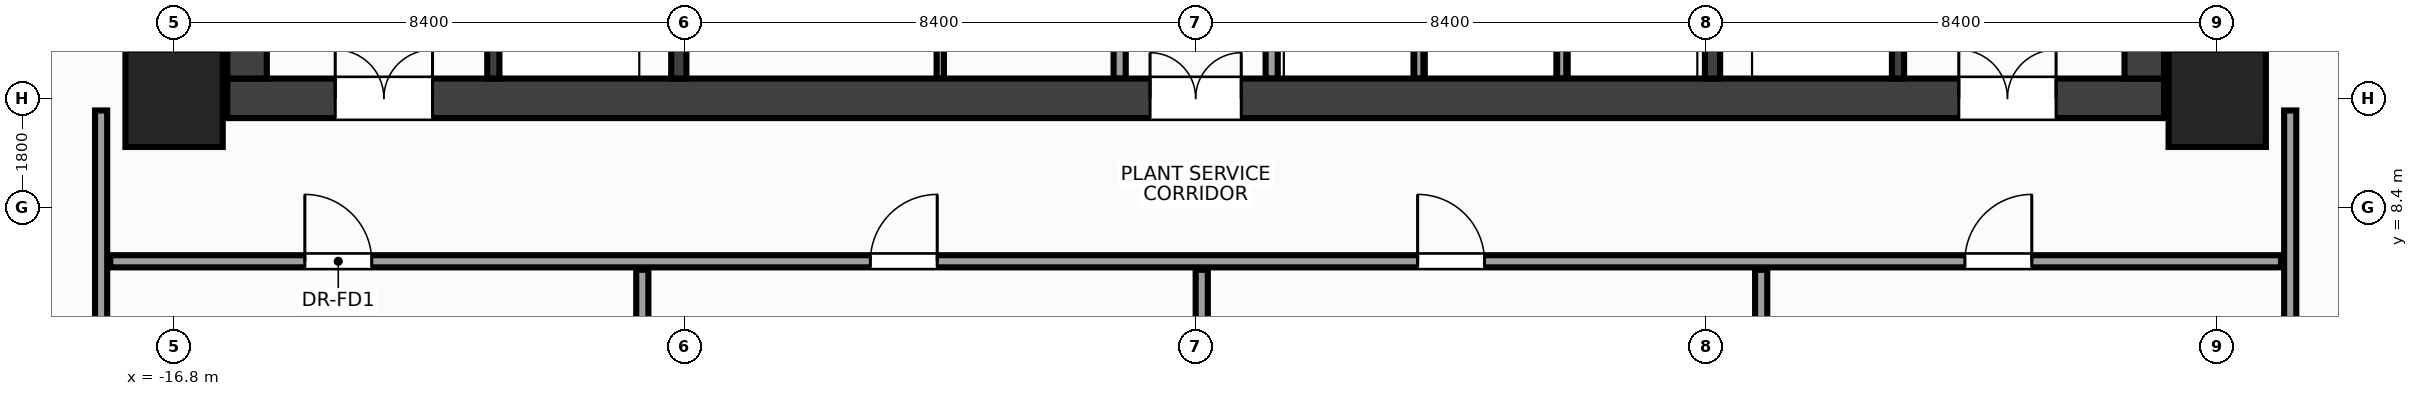
"""IFC4 building model, lengths in metres.
Left out: names, types, materials, properties, quantities, classifications, styles, units other than length and angle.
Written with IfcOpenShell. Run it as: python <this file> out.ifc"""

import sys

from ifc_helpers import new_model, si_unit, direction, frame, frame_2d, origin, origin_2d, place, context, subcontext, project, spatial, rectangle, extrude, source, transform, mapped, element, fill, save


model = new_model("IFC4")
c1 = context("Model", 3, precision=1e-05, world=origin(), true_north=direction((0.0, 1.0)))
c2 = subcontext(c1, "Body", "Model", "MODEL_VIEW")
j1 = project(units=[si_unit("LENGTHUNIT", "METRE"), si_unit("PLANEANGLEUNIT", "RADIAN")], contexts=[c1])
p1 = place(None, origin())
s1 = spatial("IfcSite", under=j1, at=p1, CompositionType="ELEMENT")
p2 = place(p1, origin())
s2 = spatial("IfcBuilding", under=s1, at=p2, CompositionType="ELEMENT")
p3 = place(p2, frame((0.0, 0.0, 124.4)))
s3 = spatial("IfcBuildingStorey", under=s2, at=p3, CompositionType="ELEMENT", Elevation=124.4)
m1 = source(origin(), c2, "Body", "SweptSolid", [
    extrude(rectangle(XDim=31.85, YDim=0.65, at=frame_2d((15.925, 0.0))), origin(), (0.0, 0.0, 1.0), 7.2),
])
p4 = place(p3, frame((-15.925, 10.2, 0.0), z_axis=(0.0, 0.0, 1.0), x_axis=(1.0, 0.0, 0.0)))
e1 = element("IfcWall", 1, at=p4, inside=s3, PredefinedType="SHEAR", context=c2, shape_type="MappedRepresentation", body=[
    mapped(m1, transform((0.0, 0.0, 0.0), x_axis=(1.0, 0.0, 0.0), y_axis=(0.0, 1.0, 0.0), z_axis=(0.0, 0.0, 1.0), scale=1.0)),
])
p5 = place(p4, frame((1.775, 0.0, 0.0)))
e2 = element("IfcOpeningElement", 2, at=p5, cuts=e1, PredefinedType="OPENING", context=c2, shape_type="SweptSolid", body=[
    extrude(rectangle(XDim=1.6, YDim=2.15, at=frame_2d((0.8, 1.075))), frame((0.0, 0.337, 0.0), z_axis=(0.0, -1.0, 0.0), x_axis=(1.0, 0.0, 0.0)), (0.0, 0.0, 1.0), 0.674),
])
p6 = place(p4, frame((28.475, 0.0, 0.0)))
e3 = element("IfcOpeningElement", 3, at=p6, cuts=e1, PredefinedType="OPENING", context=c2, shape_type="SweptSolid", body=[
    extrude(rectangle(XDim=1.6, YDim=2.15, at=frame_2d((0.8, 1.075))), frame((0.0, 0.337, 0.0), z_axis=(0.0, -1.0, 0.0), x_axis=(1.0, 0.0, 0.0)), (0.0, 0.0, 1.0), 0.674),
])
p7 = place(p4, frame((15.175, 0.0, 0.0)))
e4 = element("IfcOpeningElement", 4, at=p7, cuts=e1, PredefinedType="OPENING", context=c2, shape_type="SweptSolid", body=[
    extrude(rectangle(XDim=1.5, YDim=2.2, at=frame_2d((0.75, 1.1))), frame((0.0, 0.337, 0.0), z_axis=(0.0, -1.0, 0.0), x_axis=(1.0, 0.0, 0.0)), (0.0, 0.0, 1.0), 0.674),
])
m2 = source(origin(), c2, "Body", "SweptSolid", [
    extrude(rectangle(XDim=12.95, YDim=0.65, at=frame_2d((6.475, 0.0))), origin(), (0.0, 0.0, 1.0), 7.2),
])
for number, where, z_axis, x_axis in (
    (5, (-15.6, 10.525, 0.0), (0.0, 0.0, 1.0), (0.0, 1.0, 0.0)),
    (6, (15.6, 10.525, 0.0), (0.0, 0.0, 1.0), (0.0, 1.0, 0.0)),
):
    element("IfcWall", number, at=place(p3, frame(where, z_axis=z_axis, x_axis=x_axis)), inside=s3, PredefinedType="SHEAR", context=c2, shape_type="MappedRepresentation", body=[
        mapped(m2, transform((0.0, 0.0, 0.0), x_axis=(1.0, 0.0, 0.0), y_axis=(0.0, 1.0, 0.0), z_axis=(0.0, 0.0, 1.0), scale=1.0)),
    ])
m3 = source(origin(), c2, "Body", "SweptSolid", [
    extrude(rectangle(XDim=12.95, YDim=0.25, at=frame_2d((6.475, 0.0))), origin(), (0.0, 0.0, 1.0), 7.2),
])
p8 = place(p3, frame((-8.5, 10.525, 0.0), z_axis=(0.0, 0.0, 1.0), x_axis=(0.0, 1.0, 0.0)))
e7 = element("IfcWall", 7, at=p8, inside=s3, PredefinedType="SHEAR", context=c2, shape_type="MappedRepresentation", body=[
    mapped(m3, transform((0.0, 0.0, 0.0), x_axis=(1.0, 0.0, 0.0), y_axis=(0.0, 1.0, 0.0), z_axis=(0.0, 0.0, 1.0), scale=1.0)),
])
p9 = place(p8, frame((5.075, 0.0, 0.0)))
e8 = element("IfcOpeningElement", 8, at=p9, cuts=e7, PredefinedType="OPENING", context=c2, shape_type="SweptSolid", body=[
    extrude(rectangle(XDim=0.95, YDim=2.15, at=frame_2d((0.475, 1.075))), frame((0.0, 0.137, 0.0), z_axis=(0.0, -1.0, 0.0), x_axis=(1.0, 0.0, 0.0)), (0.0, 0.0, 1.0), 0.274),
])
p10 = place(p8, frame((8.175, 0.0, 0.0)))
e9 = element("IfcOpeningElement", 9, at=p10, cuts=e7, PredefinedType="OPENING", context=c2, shape_type="SweptSolid", body=[
    extrude(rectangle(XDim=0.95, YDim=2.15, at=frame_2d((0.475, 1.075))), frame((0.0, 0.137, 0.0), z_axis=(0.0, -1.0, 0.0), x_axis=(1.0, 0.0, 0.0)), (0.0, 0.0, 1.0), 0.274),
])
p11 = place(p3, frame((8.5, 10.525, 0.0), z_axis=(0.0, 0.0, 1.0), x_axis=(0.0, 1.0, 0.0)))
e10 = element("IfcWall", 10, at=p11, inside=s3, PredefinedType="SHEAR", context=c2, shape_type="MappedRepresentation", body=[
    mapped(m3, transform((0.0, 0.0, 0.0), x_axis=(1.0, 0.0, 0.0), y_axis=(0.0, 1.0, 0.0), z_axis=(0.0, 0.0, 1.0), scale=1.0)),
])
p12 = place(p11, frame((9.925, 0.0, 0.0)))
e11 = element("IfcOpeningElement", 11, at=p12, cuts=e10, PredefinedType="OPENING", context=c2, shape_type="SweptSolid", body=[
    extrude(rectangle(XDim=0.95, YDim=2.15, at=frame_2d((0.475, 1.075))), frame((0.0, 0.137, 0.0), z_axis=(0.0, -1.0, 0.0), x_axis=(1.0, 0.0, 0.0)), (0.0, 0.0, 1.0), 0.274),
])
m4 = source(origin(), c2, "Body", "SweptSolid", [
    extrude(rectangle(XDim=3.125, YDim=0.2, at=frame_2d((1.562, 0.0))), origin(), (0.0, 0.0, 1.0), 7.2),
])
p13 = place(p3, frame((-11.55, 10.525, 0.0), z_axis=(0.0, 0.0, 1.0), x_axis=(0.0, 1.0, 0.0)))
e12 = element("IfcWall", 12, at=p13, inside=s3, PredefinedType="SHEAR", context=c2, shape_type="MappedRepresentation", body=[
    mapped(m4, transform((0.0, 0.0, 0.0), x_axis=(1.0, 0.0, 0.0), y_axis=(0.0, 1.0, 0.0), z_axis=(0.0, 0.0, 1.0), scale=1.0)),
])
p14 = place(p13, frame((0.9, 0.0, 0.0)))
e13 = element("IfcOpeningElement", 13, at=p14, cuts=e12, PredefinedType="OPENING", context=c2, shape_type="SweptSolid", body=[
    extrude(rectangle(XDim=1.1, YDim=2.15, at=frame_2d((0.55, 1.075))), frame((0.0, 0.112, 0.0), z_axis=(0.0, -1.0, 0.0), x_axis=(1.0, 0.0, 0.0)), (0.0, 0.0, 1.0), 0.224),
])
p15 = place(p3, frame((11.55, 10.525, 0.0), z_axis=(0.0, 0.0, 1.0), x_axis=(0.0, 1.0, 0.0)))
e14 = element("IfcWall", 14, at=p15, inside=s3, PredefinedType="SHEAR", context=c2, shape_type="MappedRepresentation", body=[
    mapped(m4, transform((0.0, 0.0, 0.0), x_axis=(1.0, 0.0, 0.0), y_axis=(0.0, 1.0, 0.0), z_axis=(0.0, 0.0, 1.0), scale=1.0)),
])
p16 = place(p15, frame((0.9, 0.0, 0.0)))
e15 = element("IfcOpeningElement", 15, at=p16, cuts=e14, PredefinedType="OPENING", context=c2, shape_type="SweptSolid", body=[
    extrude(rectangle(XDim=1.1, YDim=2.15, at=frame_2d((0.55, 1.075))), frame((0.0, 0.112, 0.0), z_axis=(0.0, -1.0, 0.0), x_axis=(1.0, 0.0, 0.0)), (0.0, 0.0, 1.0), 0.224),
])
m5 = source(origin(), c2, "Body", "SweptSolid", [
    extrude(rectangle(XDim=1.6, YDim=1.6, at=origin_2d()), origin(), (0.0, 0.0, 1.0), 7.2),
])
for number, where, z_axis, x_axis in (
    (16, (-16.8, 10.2, 0.0), (0.0, 0.0, 1.0), (1.0, 0.0, 0.0)),
    (17, (16.8, 10.2, 0.0), (0.0, 0.0, 1.0), (1.0, 0.0, 0.0)),
):
    element("IfcColumn", number, at=place(p3, frame(where, z_axis=z_axis, x_axis=x_axis)), inside=s3, PredefinedType="COLUMN", context=c2, shape_type="MappedRepresentation", body=[
        mapped(m5, transform((0.0, 0.0, 0.0), x_axis=(1.0, 0.0, 0.0), y_axis=(0.0, 1.0, 0.0), z_axis=(0.0, 0.0, 1.0), scale=1.0)),
    ])
m6 = source(origin(), c2, "Body", "SweptSolid", [
    extrude(rectangle(XDim=3.415, YDim=0.2, at=frame_2d((1.708, 0.0))), origin(), (0.0, 0.0, 1.0), 6.9),
])
for number, where, z_axis, x_axis in (
    (18, (-1.25, 10.525, 0.0), (0.0, 0.0, 1.0), (0.0, 1.0, 0.0)),
    (19, (1.25, 10.525, 0.0), (0.0, 0.0, 1.0), (0.0, 1.0, 0.0)),
):
    element("IfcWall", number, at=place(p3, frame(where, z_axis=z_axis, x_axis=x_axis)), inside=s3, PredefinedType="PARTITIONING", context=c2, shape_type="MappedRepresentation", body=[
        mapped(m6, transform((0.0, 0.0, 0.0), x_axis=(1.0, 0.0, 0.0), y_axis=(0.0, 1.0, 0.0), z_axis=(0.0, 0.0, 1.0), scale=1.0)),
    ])
m7 = source(origin(), c2, "Body", "SweptSolid", [
    extrude(rectangle(XDim=3.415, YDim=0.12, at=frame_2d((1.708, 0.0))), origin(), (0.0, 0.0, 1.0), 6.9),
])
p17 = place(p3, frame((-4.2, 10.525, 0.0), z_axis=(0.0, 0.0, 1.0), x_axis=(0.0, 1.0, 0.0)))
e20 = element("IfcWall", 20, at=p17, inside=s3, PredefinedType="PARTITIONING", context=c2, shape_type="MappedRepresentation", body=[
    mapped(m7, transform((0.0, 0.0, 0.0), x_axis=(1.0, 0.0, 0.0), y_axis=(0.0, 1.0, 0.0), z_axis=(0.0, 0.0, 1.0), scale=1.0)),
])
m8 = source(origin(), c2, "Body", "SweptSolid", [
    extrude(rectangle(XDim=3.415, YDim=0.15, at=frame_2d((1.708, 0.0))), origin(), (0.0, 0.0, 1.0), 6.9),
])
for number, where, z_axis, x_axis in (
    (21, (3.67, 10.525, 0.0), (0.0, 0.0, 1.0), (0.0, 1.0, 0.0)),
    (22, (6.02, 10.525, 0.0), (0.0, 0.0, 1.0), (0.0, 1.0, 0.0)),
):
    element("IfcWall", number, at=place(p3, frame(where, z_axis=z_axis, x_axis=x_axis)), inside=s3, PredefinedType="PARTITIONING", context=c2, shape_type="MappedRepresentation", body=[
        mapped(m8, transform((0.0, 0.0, 0.0), x_axis=(1.0, 0.0, 0.0), y_axis=(0.0, 1.0, 0.0), z_axis=(0.0, 0.0, 1.0), scale=1.0)),
    ])
m9 = source(origin(), c2, "Body", "SweptSolid", [
    extrude(rectangle(XDim=22.85, YDim=0.2, at=frame_2d((11.425, 0.0))), origin(), (0.0, 0.0, 1.0), 6.435),
])
for number, where, z_axis, x_axis in (
    (23, (-18.0, -12.85, 0.0), (0.0, 0.0, 1.0), (0.0, 1.0, 0.0)),
    (24, (18.0, -12.85, 0.0), (0.0, 0.0, 1.0), (0.0, 1.0, 0.0)),
):
    element("IfcWall", number, at=place(p3, frame(where, z_axis=z_axis, x_axis=x_axis)), inside=s3, PredefinedType="PARTITIONING", context=c2, shape_type="MappedRepresentation", body=[
        mapped(m9, transform((0.0, 0.0, 0.0), x_axis=(1.0, 0.0, 0.0), y_axis=(0.0, 1.0, 0.0), z_axis=(0.0, 0.0, 1.0), scale=1.0)),
    ])
m10 = source(origin(), c2, "Body", "SweptSolid", [
    extrude(rectangle(XDim=35.7, YDim=0.2, at=frame_2d((17.85, 0.0))), origin(), (0.0, 0.0, 1.0), 6.285),
])
p18 = place(p3, frame((-17.85, 7.52, 0.0), z_axis=(0.0, 0.0, 1.0), x_axis=(1.0, 0.0, 0.0)))
e25 = element("IfcWall", 25, at=p18, inside=s3, PredefinedType="PARTITIONING", context=c2, shape_type="MappedRepresentation", body=[
    mapped(m10, transform((0.0, 0.0, 0.0), x_axis=(1.0, 0.0, 0.0), y_axis=(0.0, 1.0, 0.0), z_axis=(0.0, 0.0, 1.0), scale=1.0)),
])
p19 = place(p18, frame((3.2, 0.0, 0.0)))
e26 = element("IfcOpeningElement", 26, at=p19, cuts=e25, PredefinedType="OPENING", context=c2, shape_type="SweptSolid", body=[
    extrude(rectangle(XDim=1.1, YDim=2.15, at=frame_2d((0.55, 1.075))), frame((0.0, 0.112, 0.0), z_axis=(0.0, -1.0, 0.0), x_axis=(1.0, 0.0, 0.0)), (0.0, 0.0, 1.0), 0.224),
])
p20 = place(p18, frame((12.5, 0.0, 0.0)))
e27 = element("IfcOpeningElement", 27, at=p20, cuts=e25, PredefinedType="OPENING", context=c2, shape_type="SweptSolid", body=[
    extrude(rectangle(XDim=1.1, YDim=2.15, at=frame_2d((0.55, 1.075))), frame((0.0, 0.112, 0.0), z_axis=(0.0, -1.0, 0.0), x_axis=(1.0, 0.0, 0.0)), (0.0, 0.0, 1.0), 0.224),
])
p21 = place(p18, frame((21.5, 0.0, 0.0)))
e28 = element("IfcOpeningElement", 28, at=p21, cuts=e25, PredefinedType="OPENING", context=c2, shape_type="SweptSolid", body=[
    extrude(rectangle(XDim=1.1, YDim=2.15, at=frame_2d((0.55, 1.075))), frame((0.0, 0.112, 0.0), z_axis=(0.0, -1.0, 0.0), x_axis=(1.0, 0.0, 0.0)), (0.0, 0.0, 1.0), 0.224),
])
p22 = place(p18, frame((30.5, 0.0, 0.0)))
e29 = element("IfcOpeningElement", 29, at=p22, cuts=e25, PredefinedType="OPENING", context=c2, shape_type="SweptSolid", body=[
    extrude(rectangle(XDim=1.1, YDim=2.15, at=frame_2d((0.55, 1.075))), frame((0.0, 0.112, 0.0), z_axis=(0.0, -1.0, 0.0), x_axis=(1.0, 0.0, 0.0)), (0.0, 0.0, 1.0), 0.224),
])
m11 = source(origin(), c2, "Body", "SweptSolid", [
    extrude(rectangle(XDim=20.23, YDim=0.2, at=frame_2d((10.115, 0.0))), origin(), (0.0, 0.0, 1.0), 6.185),
])
for number, where, z_axis, x_axis in (
    (30, (-9.1, -12.85, 0.0), (0.0, 0.0, 1.0), (0.0, 1.0, 0.0)),
    (31, (0.1, -12.85, 0.0), (0.0, 0.0, 1.0), (0.0, 1.0, 0.0)),
):
    element("IfcWall", number, at=place(p3, frame(where, z_axis=z_axis, x_axis=x_axis)), inside=s3, PredefinedType="PARTITIONING", context=c2, shape_type="MappedRepresentation", body=[
        mapped(m11, transform((0.0, 0.0, 0.0), x_axis=(1.0, 0.0, 0.0), y_axis=(0.0, 1.0, 0.0), z_axis=(0.0, 0.0, 1.0), scale=1.0)),
    ])
p23 = place(p3, frame((9.3, -12.85, 0.0), z_axis=(0.0, 0.0, 1.0), x_axis=(0.0, 1.0, 0.0)))
e32 = element("IfcWall", 32, at=p23, inside=s3, PredefinedType="PARTITIONING", context=c2, shape_type="MappedRepresentation", body=[
    mapped(m11, transform((0.0, 0.0, 0.0), x_axis=(1.0, 0.0, 0.0), y_axis=(0.0, 1.0, 0.0), z_axis=(0.0, 0.0, 1.0), scale=1.0)),
])
p24 = place(p23, frame((5.2, 0.0, 0.0)))
e33 = element("IfcOpeningElement", 33, at=p24, cuts=e32, PredefinedType="OPENING", context=c2, shape_type="SweptSolid", body=[
    extrude(rectangle(XDim=1.1, YDim=2.15, at=frame_2d((0.55, 1.075))), frame((0.0, 0.112, 0.0), z_axis=(0.0, -1.0, 0.0), x_axis=(1.0, 0.0, 0.0)), (0.0, 0.0, 1.0), 0.224),
])
m12 = source(origin(), c2, "Body", "SweptSolid", [
    extrude(rectangle(XDim=1.6, YDim=2.15, at=frame_2d((0.8, 1.075))), frame((0.0, 0.025, 0.0), z_axis=(0.0, -1.0, 0.0), x_axis=(1.0, 0.0, 0.0)), (0.0, 0.0, 1.0), 0.05),
])
p25 = place(p5, origin())
e34 = element("IfcDoor", 34, at=p25, inside=s3, OperationType="DOUBLE_DOOR_SINGLE_SWING", PredefinedType="DOOR", context=c2, shape_type="MappedRepresentation", body=[
    mapped(m12, transform((0.0, 0.0, 0.0), x_axis=(1.0, 0.0, 0.0), y_axis=(0.0, 1.0, 0.0), z_axis=(0.0, 0.0, 1.0), scale=1.0)),
])
fill(e2, e34)
p26 = place(p6, origin())
e35 = element("IfcDoor", 35, at=p26, inside=s3, OperationType="DOUBLE_DOOR_SINGLE_SWING", PredefinedType="DOOR", context=c2, shape_type="MappedRepresentation", body=[
    mapped(m12, transform((0.0, 0.0, 0.0), x_axis=(1.0, 0.0, 0.0), y_axis=(0.0, 1.0, 0.0), z_axis=(0.0, 0.0, 1.0), scale=1.0)),
])
fill(e3, e35)
m13 = source(origin(), c2, "Body", "SweptSolid", [
    extrude(rectangle(XDim=1.5, YDim=2.2, at=frame_2d((0.75, 1.1))), frame((0.0, 0.025, 0.0), z_axis=(0.0, -1.0, 0.0), x_axis=(1.0, 0.0, 0.0)), (0.0, 0.0, 1.0), 0.05),
])
p27 = place(p7, origin())
e36 = element("IfcDoor", 36, at=p27, inside=s3, OperationType="DOUBLE_DOOR_SINGLE_SWING", PredefinedType="DOOR", context=c2, shape_type="MappedRepresentation", body=[
    mapped(m13, transform((0.0, 0.0, 0.0), x_axis=(1.0, 0.0, 0.0), y_axis=(0.0, 1.0, 0.0), z_axis=(0.0, 0.0, 1.0), scale=1.0)),
])
fill(e4, e36)
m14 = source(origin(), c2, "Body", "SweptSolid", [
    extrude(rectangle(XDim=1.1, YDim=2.15, at=frame_2d((0.55, 1.075))), frame((0.0, 0.025, 0.0), z_axis=(0.0, -1.0, 0.0), x_axis=(1.0, 0.0, 0.0)), (0.0, 0.0, 1.0), 0.05),
])
p28 = place(p19, origin())
e37 = element("IfcDoor", 37, at=p28, inside=s3, OperationType="SINGLE_SWING_LEFT", PredefinedType="DOOR", context=c2, shape_type="MappedRepresentation", body=[
    mapped(m14, transform((0.0, 0.0, 0.0), x_axis=(1.0, 0.0, 0.0), y_axis=(0.0, 1.0, 0.0), z_axis=(0.0, 0.0, 1.0), scale=1.0)),
])
fill(e26, e37)
p29 = place(p20, origin())
e38 = element("IfcDoor", 38, at=p29, inside=s3, OperationType="SINGLE_SWING_RIGHT", PredefinedType="DOOR", context=c2, shape_type="MappedRepresentation", body=[
    mapped(m14, transform((0.0, 0.0, 0.0), x_axis=(1.0, 0.0, 0.0), y_axis=(0.0, 1.0, 0.0), z_axis=(0.0, 0.0, 1.0), scale=1.0)),
])
fill(e27, e38)
p30 = place(p21, origin())
e39 = element("IfcDoor", 39, at=p30, inside=s3, OperationType="SINGLE_SWING_LEFT", PredefinedType="DOOR", context=c2, shape_type="MappedRepresentation", body=[
    mapped(m14, transform((0.0, 0.0, 0.0), x_axis=(1.0, 0.0, 0.0), y_axis=(0.0, 1.0, 0.0), z_axis=(0.0, 0.0, 1.0), scale=1.0)),
])
fill(e28, e39)
p31 = place(p22, origin())
e40 = element("IfcDoor", 40, at=p31, inside=s3, OperationType="SINGLE_SWING_RIGHT", PredefinedType="DOOR", context=c2, shape_type="MappedRepresentation", body=[
    mapped(m14, transform((0.0, 0.0, 0.0), x_axis=(1.0, 0.0, 0.0), y_axis=(0.0, 1.0, 0.0), z_axis=(0.0, 0.0, 1.0), scale=1.0)),
])
fill(e29, e40)
save(model, sys.argv[1])
